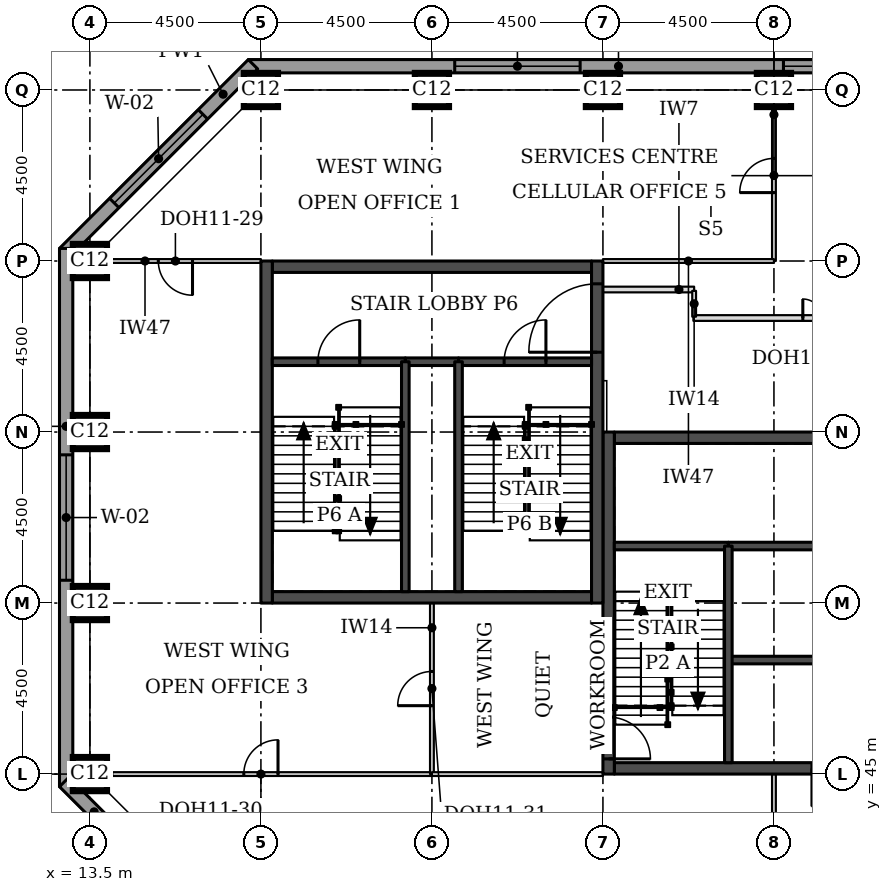
"""IFC4 building model, lengths in metres.
Left out: names, types, materials, properties, quantities, classifications, styles, units other than length and angle.
Written with IfcOpenShell. Run it as: python <this file> out.ifc"""

import sys

from ifc_helpers import new_model, si_unit, direction, frame, frame_2d, origin, origin_2d, place, context, subcontext, project, spatial, rectangle, extrude, element, fill, save


model = new_model("IFC4")
c1 = context("Model", 3, precision=1e-05, world=origin(), true_north=direction((0.0, 1.0)))
c2 = subcontext(c1, "Body", "Model", "MODEL_VIEW")
j1 = project(units=[si_unit("LENGTHUNIT", "METRE"), si_unit("PLANEANGLEUNIT", "RADIAN")], contexts=[c1])
p1 = place(None, origin())
s1 = spatial("IfcSite", under=j1, at=p1, CompositionType="ELEMENT")
p2 = place(p1, origin())
s2 = spatial("IfcBuilding", under=s1, at=p2, CompositionType="ELEMENT")
p3 = place(p2, frame((0.0, 0.0, 234.1)))
s3 = spatial("IfcBuildingStorey", under=s2, at=p3, CompositionType="ELEMENT", Elevation=234.1)
for number, where, z_axis, x_axis in (
    (1, (13.5, 45.0, 0.0), (0.0, 0.0, 1.0), (1.0, 0.0, 0.0)),
    (2, (13.5, 49.5, 0.0), (0.0, 0.0, 1.0), (1.0, 0.0, 0.0)),
    (3, (13.5, 54.0, 0.0), (0.0, 0.0, 1.0), (1.0, 0.0, 0.0)),
    (4, (13.5, 58.5, 0.0), (0.0, 0.0, 1.0), (1.0, 0.0, 0.0)),
    (5, (18.0, 63.0, 0.0), (0.0, 0.0, 1.0), (1.0, 0.0, 0.0)),
    (6, (22.5, 63.0, 0.0), (0.0, 0.0, 1.0), (1.0, 0.0, 0.0)),
    (7, (27.0, 63.0, 0.0), (0.0, 0.0, 1.0), (1.0, 0.0, 0.0)),
    (8, (31.5, 63.0, 0.0), (0.0, 0.0, 1.0), (1.0, 0.0, 0.0)),
):
    element("IfcColumn", number, at=place(p3, frame(where, z_axis=z_axis, x_axis=x_axis)), inside=s3, PredefinedType="COLUMN", context=c2, shape_type="SweptSolid", body=[
        extrude(rectangle(XDim=0.9, YDim=0.9, at=origin_2d()), origin(), (0.0, 0.0, 1.0), 3.7),
    ])
p4 = place(p3, frame((27.3, 45.15, 0.0), z_axis=(0.0, 0.0, 1.0), x_axis=(1.0, 0.0, 0.0)))
e9 = element("IfcWall", 9, at=p4, inside=s3, PredefinedType="SHEAR", context=c2, shape_type="SweptSolid", body=[
    extrude(rectangle(XDim=8.4, YDim=0.3, at=frame_2d((4.2, 0.0))), origin(), (0.0, 0.0, 1.0), 3.7),
])
p5 = place(p4, frame((5.2, 0.0, 0.0)))
e10 = element("IfcOpeningElement", 10, at=p5, cuts=e9, PredefinedType="OPENING", context=c2, shape_type="SweptSolid", body=[
    extrude(rectangle(XDim=1.0, YDim=2.1, at=frame_2d((0.5, 1.05))), frame((0.0, 0.16, 0.0), z_axis=(0.0, -1.0, 0.0), x_axis=(1.0, 0.0, 0.0)), (0.0, 0.0, 1.0), 0.32),
])
p6 = place(p3, frame((27.3, 53.85, 0.0), z_axis=(0.0, 0.0, 1.0), x_axis=(1.0, 0.0, 0.0)))
e11 = element("IfcWall", 11, at=p6, inside=s3, PredefinedType="SHEAR", context=c2, shape_type="SweptSolid", body=[
    extrude(rectangle(XDim=8.4, YDim=0.3, at=frame_2d((4.2, 0.0))), origin(), (0.0, 0.0, 1.0), 3.7),
])
p7 = place(p6, frame((6.4, 0.0, 0.0)))
e12 = element("IfcOpeningElement", 12, at=p7, cuts=e11, PredefinedType="OPENING", context=c2, shape_type="SweptSolid", body=[
    extrude(rectangle(XDim=1.1, YDim=2.1, at=frame_2d((0.55, 1.05))), frame((0.0, 0.16, 0.0), z_axis=(0.0, -1.0, 0.0), x_axis=(1.0, 0.0, 0.0)), (0.0, 0.0, 1.0), 0.32),
])
p8 = place(p3, frame((27.15, 45.0, 0.0), z_axis=(0.0, 0.0, 1.0), x_axis=(0.0, 1.0, 0.0)))
e13 = element("IfcWall", 13, at=p8, inside=s3, PredefinedType="SHEAR", context=c2, shape_type="SweptSolid", body=[
    extrude(rectangle(XDim=9.0, YDim=0.3, at=frame_2d((4.5, 0.0))), origin(), (0.0, 0.0, 1.0), 3.7),
])
p9 = place(p8, frame((0.4, 0.0, 0.0)))
e14 = element("IfcOpeningElement", 14, at=p9, cuts=e13, PredefinedType="OPENING", context=c2, shape_type="SweptSolid", body=[
    extrude(rectangle(XDim=1.1, YDim=2.1, at=frame_2d((0.55, 1.05))), frame((0.0, 0.16, 0.0), z_axis=(0.0, -1.0, 0.0), x_axis=(1.0, 0.0, 0.0)), (0.0, 0.0, 1.0), 0.32),
])
for number, where, z_axis, x_axis in (
    (15, (18.3, 49.65, 0.0), (0.0, 0.0, 1.0), (1.0, 0.0, 0.0)),
    (16, (18.3, 58.35, 0.0), (0.0, 0.0, 1.0), (1.0, 0.0, 0.0)),
):
    element("IfcWall", number, at=place(p3, frame(where, z_axis=z_axis, x_axis=x_axis)), inside=s3, PredefinedType="SHEAR", context=c2, shape_type="SweptSolid", body=[
        extrude(rectangle(XDim=8.4, YDim=0.3, at=frame_2d((4.2, 0.0))), origin(), (0.0, 0.0, 1.0), 3.7),
    ])
p10 = place(p3, frame((18.15, 49.5, 0.0), z_axis=(0.0, 0.0, 1.0), x_axis=(0.0, 1.0, 0.0)))
e17 = element("IfcWall", 17, at=p10, inside=s3, PredefinedType="SHEAR", context=c2, shape_type="SweptSolid", body=[
    extrude(rectangle(XDim=9.0, YDim=0.3, at=frame_2d((4.5, 0.0))), origin(), (0.0, 0.0, 1.0), 3.7),
])
p11 = place(p3, frame((26.85, 49.5, 0.0), z_axis=(0.0, 0.0, 1.0), x_axis=(0.0, 1.0, 0.0)))
e18 = element("IfcWall", 18, at=p11, inside=s3, PredefinedType="SHEAR", context=c2, shape_type="SweptSolid", body=[
    extrude(rectangle(XDim=9.0, YDim=0.3, at=frame_2d((4.5, 0.0))), origin(), (0.0, 0.0, 1.0), 3.7),
])
p12 = place(p11, frame((6.6, 0.0, 0.0)))
e19 = element("IfcOpeningElement", 19, at=p12, cuts=e18, PredefinedType="OPENING", context=c2, shape_type="SweptSolid", body=[
    extrude(rectangle(XDim=1.8, YDim=2.1, at=frame_2d((0.9, 1.05))), frame((0.0, 0.16, 0.0), z_axis=(0.0, -1.0, 0.0), x_axis=(1.0, 0.0, 0.0)), (0.0, 0.0, 1.0), 0.32),
])
p13 = place(p3, frame((35.55, 63.625, 0.0), z_axis=(0.0, 0.0, 1.0), x_axis=(-1.0, 0.0, 0.0)))
e20 = element("IfcWall", 20, at=p13, inside=s3, PredefinedType="STANDARD", context=c2, shape_type="SweptSolid", body=[
    extrude(rectangle(XDim=17.881, YDim=0.35, at=frame_2d((8.941, 0.0))), origin(), (0.0, 0.0, 1.0), 3.525),
])
p14 = place(p13, frame((0.5, 0.0, 0.9)))
e21 = element("IfcOpeningElement", 21, at=p14, cuts=e20, PredefinedType="OPENING", context=c2, shape_type="SweptSolid", body=[
    extrude(rectangle(XDim=3.3, YDim=1.9, at=frame_2d((1.65, 0.95))), frame((0.0, 0.185, 0.0), z_axis=(0.0, -1.0, 0.0), x_axis=(1.0, 0.0, 0.0)), (0.0, 0.0, 1.0), 0.37),
])
p15 = place(p13, frame((9.15, 0.0, 0.9)))
e22 = element("IfcOpeningElement", 22, at=p15, cuts=e20, PredefinedType="OPENING", context=c2, shape_type="SweptSolid", body=[
    extrude(rectangle(XDim=3.3, YDim=1.9, at=frame_2d((1.65, 0.95))), frame((0.0, 0.185, 0.0), z_axis=(0.0, -1.0, 0.0), x_axis=(1.0, 0.0, 0.0)), (0.0, 0.0, 1.0), 0.37),
])
p16 = place(p3, frame((17.792, 63.676, 0.0), z_axis=(0.0, 0.0, 1.0), x_axis=(-0.707106781187, -0.707106781187, 0.0)))
e23 = element("IfcWall", 23, at=p16, inside=s3, PredefinedType="STANDARD", context=c2, shape_type="SweptSolid", body=[
    extrude(rectangle(XDim=7.027, YDim=0.35, at=frame_2d((3.513, 0.0))), origin(), (0.0, 0.0, 1.0), 3.525),
])
p17 = place(p16, frame((1.863, 0.0, 0.9)))
e24 = element("IfcOpeningElement", 24, at=p17, cuts=e23, PredefinedType="OPENING", context=c2, shape_type="SweptSolid", body=[
    extrude(rectangle(XDim=3.3, YDim=1.9, at=frame_2d((1.65, 0.95))), frame((0.0, 0.185, 0.0), z_axis=(0.0, -1.0, 0.0), x_axis=(1.0, 0.0, 0.0)), (0.0, 0.0, 1.0), 0.37),
])
p18 = place(p3, frame((12.875, 58.831, 0.0), z_axis=(0.0, 0.0, 1.0), x_axis=(0.0, -1.0, 0.0)))
e25 = element("IfcWall", 25, at=p18, inside=s3, PredefinedType="STANDARD", context=c2, shape_type="SweptSolid", body=[
    extrude(rectangle(XDim=14.163, YDim=0.35, at=frame_2d((7.081, 0.0))), origin(), (0.0, 0.0, 1.0), 3.525),
])
p19 = place(p18, frame((5.431, 0.0, 0.9)))
e26 = element("IfcOpeningElement", 26, at=p19, cuts=e25, PredefinedType="OPENING", context=c2, shape_type="SweptSolid", body=[
    extrude(rectangle(XDim=3.3, YDim=1.9, at=frame_2d((1.65, 0.95))), frame((0.0, 0.185, 0.0), z_axis=(0.0, -1.0, 0.0), x_axis=(1.0, 0.0, 0.0)), (0.0, 0.0, 1.0), 0.37),
])
p20 = place(p3, frame((12.824, 44.792, 0.0), z_axis=(0.0, 0.0, 1.0), x_axis=(0.707106781187, -0.707106781187, 0.0)))
e27 = element("IfcWall", 27, at=p20, inside=s3, PredefinedType="STANDARD", context=c2, shape_type="SweptSolid", body=[
    extrude(rectangle(XDim=7.027, YDim=0.35, at=frame_2d((3.513, 0.0))), origin(), (0.0, 0.0, 1.0), 3.525),
])
p21 = place(p20, frame((1.863, 0.0, 0.9)))
e28 = element("IfcOpeningElement", 28, at=p21, cuts=e27, PredefinedType="OPENING", context=c2, shape_type="SweptSolid", body=[
    extrude(rectangle(XDim=3.3, YDim=1.9, at=frame_2d((1.65, 0.95))), frame((0.0, 0.185, 0.0), z_axis=(0.0, -1.0, 0.0), x_axis=(1.0, 0.0, 0.0)), (0.0, 0.0, 1.0), 0.37),
])
p22 = place(p3, frame((29.38, 57.0, 0.0), z_axis=(0.0, 0.0, 1.0), x_axis=(1.0, 0.0, 0.0)))
e29 = element("IfcWall", 29, at=p22, inside=s3, PredefinedType="PARTITIONING", context=c2, shape_type="SweptSolid", body=[
    extrude(rectangle(XDim=6.62, YDim=0.15, at=frame_2d((3.31, 0.0))), origin(), (0.0, 0.0, 1.0), 3.55),
])
p23 = place(p22, frame((2.88, 0.0, 0.0)))
e30 = element("IfcOpeningElement", 30, at=p23, cuts=e29, PredefinedType="OPENING", context=c2, shape_type="SweptSolid", body=[
    extrude(rectangle(XDim=1.0, YDim=2.1, at=frame_2d((0.5, 1.05))), frame((0.0, 0.085, 0.0), z_axis=(0.0, -1.0, 0.0), x_axis=(1.0, 0.0, 0.0)), (0.0, 0.0, 1.0), 0.17),
])
p24 = place(p3, frame((31.5, 63.0, 0.0), z_axis=(0.0, 0.0, 1.0), x_axis=(0.0, -1.0, 0.0)))
e31 = element("IfcWall", 31, at=p24, inside=s3, PredefinedType="PARTITIONING", context=c2, shape_type="SweptSolid", body=[
    extrude(rectangle(XDim=4.5, YDim=0.1, at=frame_2d((2.25, 0.0))), origin(), (0.0, 0.0, 1.0), 3.55),
])
p25 = place(p24, frame((1.8, 0.0, 0.0)))
e32 = element("IfcOpeningElement", 32, at=p25, cuts=e31, PredefinedType="OPENING", context=c2, shape_type="SweptSolid", body=[
    extrude(rectangle(XDim=0.9, YDim=2.1, at=frame_2d((0.45, 1.05))), frame((0.0, 0.06, 0.0), z_axis=(0.0, -1.0, 0.0), x_axis=(1.0, 0.0, 0.0)), (0.0, 0.0, 1.0), 0.12),
])
p26 = place(p3, frame((31.5, 58.5, 0.0), z_axis=(0.0, 0.0, 1.0), x_axis=(-1.0, 0.0, 0.0)))
e33 = element("IfcWall", 33, at=p26, inside=s3, PredefinedType="PARTITIONING", context=c2, shape_type="SweptSolid", body=[
    extrude(rectangle(XDim=4.5, YDim=0.1, at=frame_2d((2.25, 0.0))), origin(), (0.0, 0.0, 1.0), 2.55),
])
p27 = place(p3, frame((13.5, 58.5, 0.0), z_axis=(0.0, 0.0, 1.0), x_axis=(1.0, 0.0, 0.0)))
e34 = element("IfcWall", 34, at=p27, inside=s3, PredefinedType="PARTITIONING", context=c2, shape_type="SweptSolid", body=[
    extrude(rectangle(XDim=4.5, YDim=0.1, at=frame_2d((2.25, 0.0))), origin(), (0.0, 0.0, 1.0), 2.55),
])
p28 = place(p27, frame((1.8, 0.0, 0.0)))
e35 = element("IfcOpeningElement", 35, at=p28, cuts=e34, PredefinedType="OPENING", context=c2, shape_type="SweptSolid", body=[
    extrude(rectangle(XDim=0.9, YDim=2.1, at=frame_2d((0.45, 1.05))), frame((0.0, 0.06, 0.0), z_axis=(0.0, -1.0, 0.0), x_axis=(1.0, 0.0, 0.0)), (0.0, 0.0, 1.0), 0.12),
])
p29 = place(p3, frame((22.5, 45.0, 0.0), z_axis=(0.0, 0.0, 1.0), x_axis=(-1.0, 0.0, 0.0)))
e36 = element("IfcWall", 36, at=p29, inside=s3, PredefinedType="PARTITIONING", context=c2, shape_type="SweptSolid", body=[
    extrude(rectangle(XDim=9.0, YDim=0.1, at=frame_2d((4.5, 0.0))), origin(), (0.0, 0.0, 1.0), 2.55),
])
p30 = place(p29, frame((4.05, 0.0, 0.0)))
e37 = element("IfcOpeningElement", 37, at=p30, cuts=e36, PredefinedType="OPENING", context=c2, shape_type="SweptSolid", body=[
    extrude(rectangle(XDim=0.9, YDim=2.1, at=frame_2d((0.45, 1.05))), frame((0.0, 0.06, 0.0), z_axis=(0.0, -1.0, 0.0), x_axis=(1.0, 0.0, 0.0)), (0.0, 0.0, 1.0), 0.12),
])
p31 = place(p3, frame((22.5, 49.5, 0.0), z_axis=(0.0, 0.0, 1.0), x_axis=(0.0, -1.0, 0.0)))
e38 = element("IfcWall", 38, at=p31, inside=s3, PredefinedType="PARTITIONING", context=c2, shape_type="SweptSolid", body=[
    extrude(rectangle(XDim=4.5, YDim=0.1, at=frame_2d((2.25, 0.0))), origin(), (0.0, 0.0, 1.0), 3.55),
])
p32 = place(p31, frame((1.8, 0.0, 0.0)))
e39 = element("IfcOpeningElement", 39, at=p32, cuts=e38, PredefinedType="OPENING", context=c2, shape_type="SweptSolid", body=[
    extrude(rectangle(XDim=0.9, YDim=2.1, at=frame_2d((0.45, 1.05))), frame((0.0, 0.06, 0.0), z_axis=(0.0, -1.0, 0.0), x_axis=(1.0, 0.0, 0.0)), (0.0, 0.0, 1.0), 0.12),
])
p33 = place(p3, frame((22.5, 45.0, 0.0), z_axis=(0.0, 0.0, 1.0), x_axis=(1.0, 0.0, 0.0)))
e40 = element("IfcWall", 40, at=p33, inside=s3, PredefinedType="PARTITIONING", context=c2, shape_type="SweptSolid", body=[
    extrude(rectangle(XDim=4.5, YDim=0.1, at=frame_2d((2.25, 0.0))), origin(), (0.0, 0.0, 1.0), 2.55),
])
p34 = place(p3, frame((31.5, 45.0, 0.0), z_axis=(0.0, 0.0, 1.0), x_axis=(0.0, -1.0, 0.0)))
e41 = element("IfcWall", 41, at=p34, inside=s3, PredefinedType="PARTITIONING", context=c2, shape_type="SweptSolid", body=[
    extrude(rectangle(XDim=4.5, YDim=0.1, at=frame_2d((2.25, 0.0))), origin(), (0.0, 0.0, 1.0), 3.55),
])
p35 = place(p34, frame((1.8, 0.0, 0.0)))
e42 = element("IfcOpeningElement", 42, at=p35, cuts=e41, PredefinedType="OPENING", context=c2, shape_type="SweptSolid", body=[
    extrude(rectangle(XDim=0.9, YDim=2.1, at=frame_2d((0.45, 1.05))), frame((0.0, 0.06, 0.0), z_axis=(0.0, -1.0, 0.0), x_axis=(1.0, 0.0, 0.0)), (0.0, 0.0, 1.0), 0.12),
])
p36 = place(p3, frame((27.0, 57.75, 0.0), z_axis=(0.0, 0.0, 1.0), x_axis=(1.0, 0.0, 0.0)))
e43 = element("IfcWall", 43, at=p36, inside=s3, PredefinedType="PARTITIONING", context=c2, shape_type="SweptSolid", body=[
    extrude(rectangle(XDim=2.4, YDim=0.15, at=frame_2d((1.2, 0.0))), origin(), (0.0, 0.0, 1.0), 3.55),
])
p37 = place(p3, frame((29.4, 57.715, 0.0), z_axis=(0.0, 0.0, 1.0), x_axis=(0.0, -1.0, 0.0)))
e44 = element("IfcWall", 44, at=p37, inside=s3, PredefinedType="PARTITIONING", context=c2, shape_type="SweptSolid", body=[
    extrude(rectangle(XDim=0.68, YDim=0.1, at=frame_2d((0.34, 0.0))), origin(), (0.0, 0.0, 1.0), 3.55),
])
p38 = place(p3, frame((30.3, 48.0, 0.0), z_axis=(0.0, 0.0, 1.0), x_axis=(1.0, 0.0, 0.0)))
e45 = element("IfcWall", 45, at=p38, inside=s3, PredefinedType="SOLIDWALL", context=c2, shape_type="SweptSolid", body=[
    extrude(rectangle(XDim=2.4, YDim=0.2, at=frame_2d((1.2, 0.0))), origin(), (0.0, 0.0, 1.0), 3.55),
])
p39 = place(p3, frame((30.3, 51.0, 0.0), z_axis=(0.0, 0.0, 1.0), x_axis=(1.0, 0.0, 0.0)))
e46 = element("IfcWall", 46, at=p39, inside=s3, PredefinedType="SOLIDWALL", context=c2, shape_type="SweptSolid", body=[
    extrude(rectangle(XDim=2.4, YDim=0.2, at=frame_2d((1.2, 0.0))), origin(), (0.0, 0.0, 1.0), 3.7),
])
p40 = place(p3, frame((27.3, 51.0, 0.0), z_axis=(0.0, 0.0, 1.0), x_axis=(1.0, 0.0, 0.0)))
e47 = element("IfcWall", 47, at=p40, inside=s3, PredefinedType="SOLIDWALL", context=c2, shape_type="SweptSolid", body=[
    extrude(rectangle(XDim=3.0, YDim=0.2, at=frame_2d((1.5, 0.0))), origin(), (0.0, 0.0, 1.0), 3.55),
])
p41 = place(p3, frame((30.3, 45.3, 0.0), z_axis=(0.0, 0.0, 1.0), x_axis=(0.0, 1.0, 0.0)))
e48 = element("IfcWall", 48, at=p41, inside=s3, PredefinedType="SOLIDWALL", context=c2, shape_type="SweptSolid", body=[
    extrude(rectangle(XDim=5.7, YDim=0.2, at=frame_2d((2.85, 0.0))), origin(), (0.0, 0.0, 1.0), 3.55),
])
p42 = place(p3, frame((21.8, 55.85, 0.0), z_axis=(0.0, 0.0, 1.0), x_axis=(1.0, 0.0, 0.0)))
e49 = element("IfcWall", 49, at=p42, inside=s3, PredefinedType="SOLIDWALL", context=c2, shape_type="SweptSolid", body=[
    extrude(rectangle(XDim=1.4, YDim=0.2, at=frame_2d((0.7, 0.0))), origin(), (0.0, 0.0, 1.0), 3.55),
])
p43 = place(p3, frame((18.3, 55.85, 0.0), z_axis=(0.0, 0.0, 1.0), x_axis=(1.0, 0.0, 0.0)))
e50 = element("IfcWall", 50, at=p43, inside=s3, PredefinedType="SOLIDWALL", context=c2, shape_type="SweptSolid", body=[
    extrude(rectangle(XDim=3.5, YDim=0.2, at=frame_2d((1.75, 0.0))), origin(), (0.0, 0.0, 1.0), 3.55),
])
p44 = place(p43, frame((1.2, 0.0, 0.0)))
e51 = element("IfcOpeningElement", 51, at=p44, cuts=e50, PredefinedType="OPENING", context=c2, shape_type="SweptSolid", body=[
    extrude(rectangle(XDim=1.1, YDim=2.1, at=frame_2d((0.55, 1.05))), frame((0.0, 0.11, 0.0), z_axis=(0.0, -1.0, 0.0), x_axis=(1.0, 0.0, 0.0)), (0.0, 0.0, 1.0), 0.22),
])
p45 = place(p3, frame((23.2, 55.85, 0.0), z_axis=(0.0, 0.0, 1.0), x_axis=(1.0, 0.0, 0.0)))
e52 = element("IfcWall", 52, at=p45, inside=s3, PredefinedType="SOLIDWALL", context=c2, shape_type="SweptSolid", body=[
    extrude(rectangle(XDim=3.5, YDim=0.2, at=frame_2d((1.75, 0.0))), origin(), (0.0, 0.0, 1.0), 3.55),
])
p46 = place(p45, frame((1.2, 0.0, 0.0)))
e53 = element("IfcOpeningElement", 53, at=p46, cuts=e52, PredefinedType="OPENING", context=c2, shape_type="SweptSolid", body=[
    extrude(rectangle(XDim=1.1, YDim=2.1, at=frame_2d((0.55, 1.05))), frame((0.0, 0.11, 0.0), z_axis=(0.0, -1.0, 0.0), x_axis=(1.0, 0.0, 0.0)), (0.0, 0.0, 1.0), 0.22),
])
for number, where, z_axis, x_axis in (
    (54, (21.8, 49.8, 0.0), (0.0, 0.0, 1.0), (0.0, 1.0, 0.0)),
    (55, (23.2, 49.8, 0.0), (0.0, 0.0, 1.0), (0.0, 1.0, 0.0)),
):
    element("IfcWall", number, at=place(p3, frame(where, z_axis=z_axis, x_axis=x_axis)), inside=s3, PredefinedType="SOLIDWALL", context=c2, shape_type="SweptSolid", body=[
        extrude(rectangle(XDim=6.05, YDim=0.2, at=frame_2d((3.025, 0.0))), origin(), (0.0, 0.0, 1.0), 3.55),
    ])
p47 = place(p14, origin())
e56 = element("IfcWindow", 56, at=p47, inside=s3, PartitioningType="SINGLE_PANEL", PredefinedType="WINDOW", context=c2, shape_type="SweptSolid", body=[
    extrude(rectangle(XDim=3.3, YDim=1.9, at=frame_2d((1.65, 0.95))), frame((0.0, 0.085, 0.0), z_axis=(0.0, -1.0, 0.0), x_axis=(1.0, 0.0, 0.0)), (0.0, 0.0, 1.0), 0.06),
])
fill(e21, e56)
p48 = place(p15, origin())
e57 = element("IfcWindow", 57, at=p48, inside=s3, PartitioningType="SINGLE_PANEL", PredefinedType="WINDOW", context=c2, shape_type="SweptSolid", body=[
    extrude(rectangle(XDim=3.3, YDim=1.9, at=frame_2d((1.65, 0.95))), frame((0.0, 0.085, 0.0), z_axis=(0.0, -1.0, 0.0), x_axis=(1.0, 0.0, 0.0)), (0.0, 0.0, 1.0), 0.06),
])
fill(e22, e57)
p49 = place(p17, origin())
e58 = element("IfcWindow", 58, at=p49, inside=s3, PartitioningType="SINGLE_PANEL", PredefinedType="WINDOW", context=c2, shape_type="SweptSolid", body=[
    extrude(rectangle(XDim=3.3, YDim=1.9, at=frame_2d((1.65, 0.95))), frame((0.0, 0.085, 0.0), z_axis=(0.0, -1.0, 0.0), x_axis=(1.0, 0.0, 0.0)), (0.0, 0.0, 1.0), 0.06),
])
fill(e24, e58)
p50 = place(p19, origin())
e59 = element("IfcWindow", 59, at=p50, inside=s3, PartitioningType="SINGLE_PANEL", PredefinedType="WINDOW", context=c2, shape_type="SweptSolid", body=[
    extrude(rectangle(XDim=3.3, YDim=1.9, at=frame_2d((1.65, 0.95))), frame((0.0, 0.085, 0.0), z_axis=(0.0, -1.0, 0.0), x_axis=(1.0, 0.0, 0.0)), (0.0, 0.0, 1.0), 0.06),
])
fill(e26, e59)
p51 = place(p23, origin())
e60 = element("IfcDoor", 60, at=p51, inside=s3, OperationType="DOUBLE_DOOR_SINGLE_SWING", PredefinedType="DOOR", context=c2, shape_type="SweptSolid", body=[
    extrude(rectangle(XDim=1.0, YDim=2.1, at=frame_2d((0.5, 1.05))), frame((0.0, 0.025, 0.0), z_axis=(0.0, -1.0, 0.0), x_axis=(1.0, 0.0, 0.0)), (0.0, 0.0, 1.0), 0.05),
])
fill(e30, e60)
p52 = place(p25, frame((0.9, 0.0, 0.0), z_axis=(0.0, 0.0, 1.0), x_axis=(-1.0, 0.0, 0.0)))
e61 = element("IfcDoor", 61, at=p52, inside=s3, OperationType="SINGLE_SWING_LEFT", PredefinedType="DOOR", context=c2, shape_type="SweptSolid", body=[
    extrude(rectangle(XDim=0.9, YDim=2.1, at=frame_2d((0.45, 1.05))), frame((0.0, 0.025, 0.0), z_axis=(0.0, -1.0, 0.0), x_axis=(1.0, 0.0, 0.0)), (0.0, 0.0, 1.0), 0.05),
])
fill(e32, e61)
p53 = place(p28, frame((0.9, 0.0, 0.0), z_axis=(0.0, 0.0, 1.0), x_axis=(-1.0, 0.0, 0.0)))
e62 = element("IfcDoor", 62, at=p53, inside=s3, OperationType="SINGLE_SWING_LEFT", PredefinedType="DOOR", context=c2, shape_type="SweptSolid", body=[
    extrude(rectangle(XDim=0.9, YDim=2.1, at=frame_2d((0.45, 1.05))), frame((0.0, 0.025, 0.0), z_axis=(0.0, -1.0, 0.0), x_axis=(1.0, 0.0, 0.0)), (0.0, 0.0, 1.0), 0.05),
])
fill(e35, e62)
p54 = place(p30, frame((0.9, 0.0, 0.0), z_axis=(0.0, 0.0, 1.0), x_axis=(-1.0, 0.0, 0.0)))
e63 = element("IfcDoor", 63, at=p54, inside=s3, OperationType="SINGLE_SWING_RIGHT", PredefinedType="DOOR", context=c2, shape_type="SweptSolid", body=[
    extrude(rectangle(XDim=0.9, YDim=2.1, at=frame_2d((0.45, 1.05))), frame((0.0, 0.025, 0.0), z_axis=(0.0, -1.0, 0.0), x_axis=(1.0, 0.0, 0.0)), (0.0, 0.0, 1.0), 0.05),
])
fill(e37, e63)
p55 = place(p32, frame((0.9, 0.0, 0.0), z_axis=(0.0, 0.0, 1.0), x_axis=(-1.0, 0.0, 0.0)))
e64 = element("IfcDoor", 64, at=p55, inside=s3, OperationType="SINGLE_SWING_LEFT", PredefinedType="DOOR", context=c2, shape_type="SweptSolid", body=[
    extrude(rectangle(XDim=0.9, YDim=2.1, at=frame_2d((0.45, 1.05))), frame((0.0, 0.025, 0.0), z_axis=(0.0, -1.0, 0.0), x_axis=(1.0, 0.0, 0.0)), (0.0, 0.0, 1.0), 0.05),
])
fill(e39, e64)
p56 = place(p9, frame((1.1, 0.0, 0.0), z_axis=(0.0, 0.0, 1.0), x_axis=(-1.0, 0.0, 0.0)))
e65 = element("IfcDoor", 65, at=p56, inside=s3, OperationType="SINGLE_SWING_RIGHT", PredefinedType="DOOR", context=c2, shape_type="SweptSolid", body=[
    extrude(rectangle(XDim=1.1, YDim=2.1, at=frame_2d((0.55, 1.05))), frame((0.0, 0.025, 0.0), z_axis=(0.0, -1.0, 0.0), x_axis=(1.0, 0.0, 0.0)), (0.0, 0.0, 1.0), 0.05),
])
fill(e14, e65)
p57 = place(p44, origin())
e66 = element("IfcDoor", 66, at=p57, inside=s3, OperationType="SINGLE_SWING_RIGHT", PredefinedType="DOOR", context=c2, shape_type="SweptSolid", body=[
    extrude(rectangle(XDim=1.1, YDim=2.1, at=frame_2d((0.55, 1.05))), frame((0.0, 0.025, 0.0), z_axis=(0.0, -1.0, 0.0), x_axis=(1.0, 0.0, 0.0)), (0.0, 0.0, 1.0), 0.05),
])
fill(e51, e66)
p58 = place(p46, origin())
e67 = element("IfcDoor", 67, at=p58, inside=s3, OperationType="SINGLE_SWING_RIGHT", PredefinedType="DOOR", context=c2, shape_type="SweptSolid", body=[
    extrude(rectangle(XDim=1.1, YDim=2.1, at=frame_2d((0.55, 1.05))), frame((0.0, 0.025, 0.0), z_axis=(0.0, -1.0, 0.0), x_axis=(1.0, 0.0, 0.0)), (0.0, 0.0, 1.0), 0.05),
])
fill(e53, e67)
p59 = place(p12, origin())
e68 = element("IfcDoor", 68, at=p59, inside=s3, OperationType="SINGLE_SWING_LEFT", PredefinedType="DOOR", context=c2, shape_type="SweptSolid", body=[
    extrude(rectangle(XDim=1.8, YDim=2.1, at=frame_2d((0.9, 1.05))), frame((0.0, 0.025, 0.0), z_axis=(0.0, -1.0, 0.0), x_axis=(1.0, 0.0, 0.0)), (0.0, 0.0, 1.0), 0.05),
])
fill(e19, e68)
save(model, sys.argv[1])
